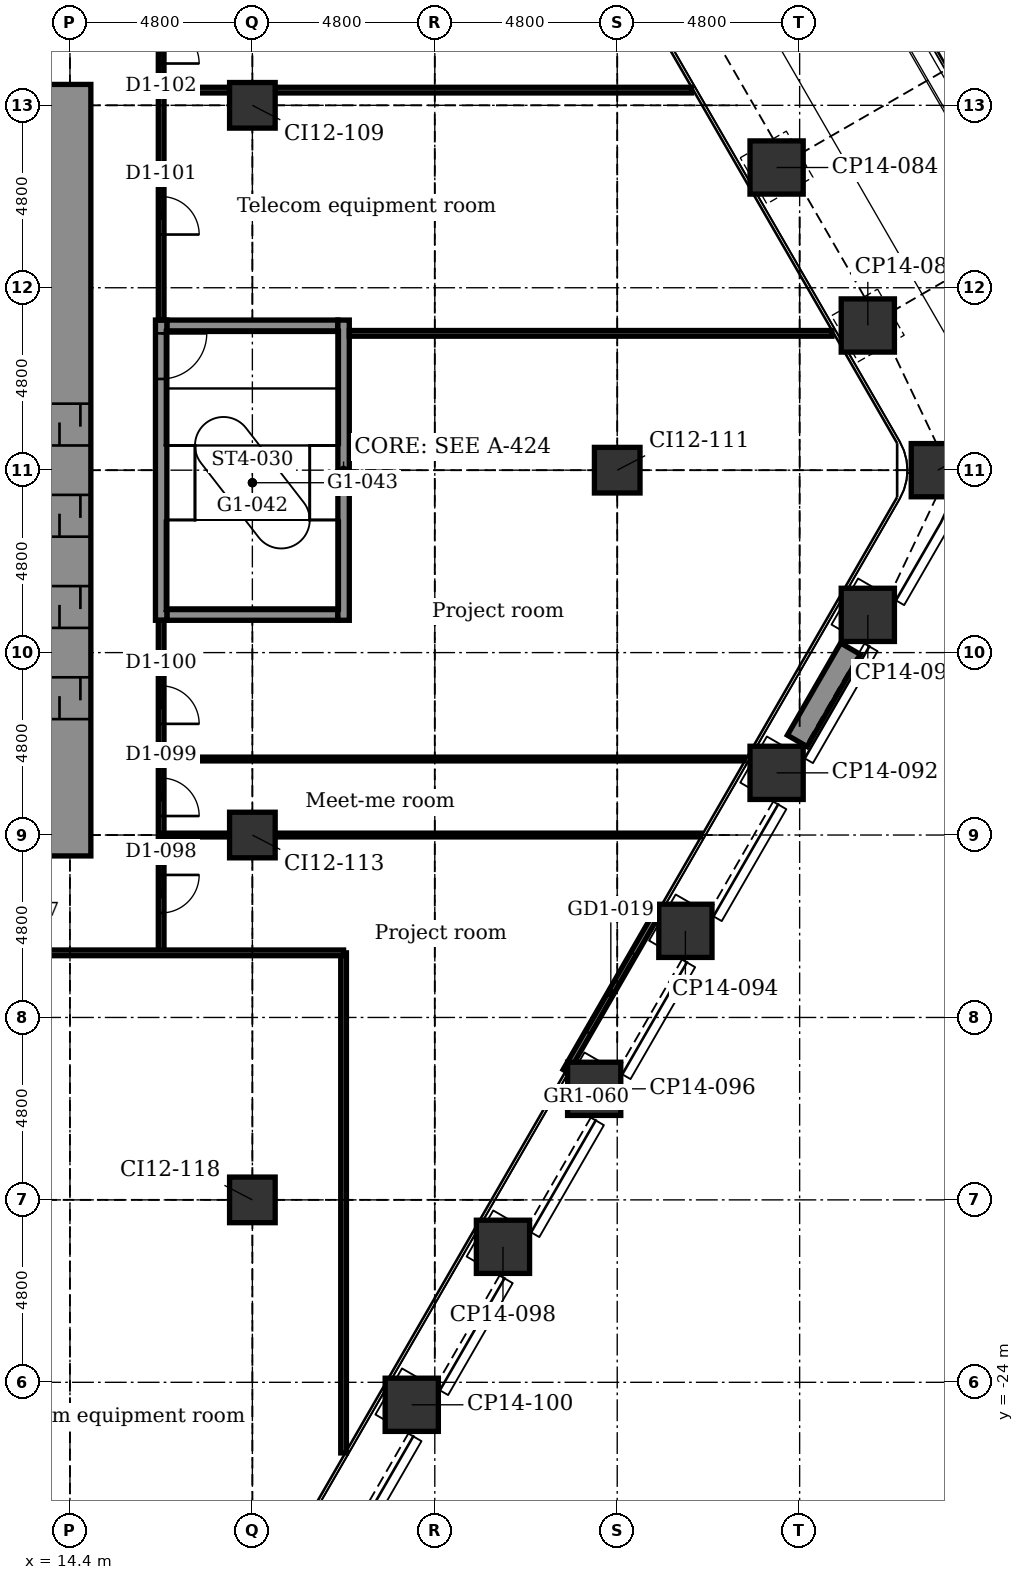
"""IFC4 building model, lengths in metres.
Left out: names, types, materials, properties, quantities, classifications, styles, units other than length and angle.
Written with IfcOpenShell. Run it as: python <this file> out.ifc"""

import sys

from ifc_helpers import new_model, si_unit, direction, frame, frame_2d, origin, origin_2d, place, context, subcontext, project, spatial, rectangle, extrude, element, fill, save


model = new_model("IFC4")
c1 = context("Model", 3, precision=1e-05, world=origin(), true_north=direction((0.0, 1.0)))
c2 = subcontext(c1, "Body", "Model", "MODEL_VIEW")
j1 = project(units=[si_unit("LENGTHUNIT", "METRE"), si_unit("PLANEANGLEUNIT", "RADIAN")], contexts=[c1])
p1 = place(None, origin())
s1 = spatial("IfcSite", under=j1, at=p1, CompositionType="ELEMENT")
p2 = place(p1, origin())
s2 = spatial("IfcBuilding", under=s1, at=p2, CompositionType="ELEMENT")
p3 = place(p2, frame((0.0, 0.0, 38.9)))
s3 = spatial("IfcBuildingStorey", under=s2, at=p3, CompositionType="ELEMENT", Elevation=38.9)
for number, where, z_axis, x_axis in (
    (1, (32.994, 7.964, -0.25), (0.0, 0.0, 1.0), (0.866, 0.5, 0.0)),
    (2, (35.394, 3.807, -0.25), (0.0, 0.0, 1.0), (0.866, 0.5, 0.0)),
    (3, (37.236, 0.0, -0.25), (0.0, 0.0, 1.0), (1.0, 0.0, 0.0)),
    (4, (35.394, -3.807, -0.25), (0.0, 0.0, 1.0), (0.5, 0.866, 0.0)),
    (5, (32.994, -7.964, -0.25), (0.0, 0.0, 1.0), (0.5, 0.866, 0.0)),
    (6, (30.594, -12.121, -0.25), (0.0, 0.0, 1.0), (0.5, 0.866, 0.0)),
    (7, (28.194, -16.278, -0.25), (0.0, 0.0, 1.0), (0.5, 0.866, 0.0)),
    (8, (25.794, -20.435, -0.25), (0.0, 0.0, 1.0), (0.5, 0.866, 0.0)),
    (9, (23.394, -24.592, -0.25), (0.0, 0.0, 1.0), (0.5, 0.866, 0.0)),
):
    element("IfcColumn", number, at=place(p3, frame(where, z_axis=z_axis, x_axis=x_axis)), inside=s3, PredefinedType="COLUMN", context=c2, shape_type="SweptSolid", body=[
        extrude(rectangle(XDim=1.4, YDim=1.4, at=origin_2d()), origin(), (0.0, 0.0, 1.0), 5.5),
    ])
for number, where, z_axis, x_axis in (
    (10, (19.2, -19.2, -0.25), (0.0, 0.0, 1.0), (1.0, 0.0, 0.0)),
    (11, (19.2, -9.6, -0.25), (0.0, 0.0, 1.0), (1.0, 0.0, 0.0)),
    (12, (19.2, 9.6, -0.25), (0.0, 0.0, 1.0), (1.0, 0.0, 0.0)),
    (13, (28.8, 0.0, -0.25), (0.0, 0.0, 1.0), (1.0, 0.0, 0.0)),
):
    element("IfcColumn", number, at=place(p3, frame(where, z_axis=z_axis, x_axis=x_axis)), inside=s3, PredefinedType="COLUMN", context=c2, shape_type="SweptSolid", body=[
        extrude(rectangle(XDim=1.2, YDim=1.2, at=origin_2d()), origin(), (0.0, 0.0, 1.0), 5.5),
    ])
for number, where, z_axis, x_axis in (
    (14, (16.95, -3.8, -0.25), (0.0, 0.0, 1.0), (1.0, 0.0, 0.0)),
    (15, (16.95, 3.8, -0.25), (0.0, 0.0, 1.0), (1.0, 0.0, 0.0)),
):
    element("IfcWall", number, at=place(p3, frame(where, z_axis=z_axis, x_axis=x_axis)), inside=s3, PredefinedType="STANDARD", context=c2, shape_type="SweptSolid", body=[
        extrude(rectangle(XDim=4.5, YDim=0.3, at=frame_2d((2.25, 0.0))), origin(), (0.0, 0.0, 1.0), 5.5),
    ])
p4 = place(p3, frame((14.4, -10.15, -0.25), z_axis=(0.0, 0.0, 1.0), x_axis=(0.0, 1.0, 0.0)))
e16 = element("IfcWall", 16, at=p4, inside=s3, PredefinedType="SHEAR", context=c2, shape_type="SweptSolid", body=[
    extrude(rectangle(XDim=20.3, YDim=1.1, at=frame_2d((10.15, 0.0))), origin(), (0.0, 0.0, 1.0), 5.5),
])
p5 = place(p4, frame((3.6, 0.0, 0.25)))
e17 = element("IfcOpeningElement", 17, at=p5, cuts=e16, PredefinedType="OPENING", context=c2, shape_type="SweptSolid", body=[
    extrude(rectangle(XDim=1.1, YDim=2.1, at=frame_2d((0.55, 1.05))), frame((0.0, 0.56, 0.0), z_axis=(0.0, -1.0, 0.0), x_axis=(1.0, 0.0, 0.0)), (0.0, 0.0, 1.0), 1.12),
])
p6 = place(p4, frame((6.0, 0.0, 0.25)))
e18 = element("IfcOpeningElement", 18, at=p6, cuts=e16, PredefinedType="OPENING", context=c2, shape_type="SweptSolid", body=[
    extrude(rectangle(XDim=1.1, YDim=2.1, at=frame_2d((0.55, 1.05))), frame((0.0, 0.56, 0.0), z_axis=(0.0, -1.0, 0.0), x_axis=(1.0, 0.0, 0.0)), (0.0, 0.0, 1.0), 1.12),
])
p7 = place(p4, frame((8.4, 0.0, 0.25)))
e19 = element("IfcOpeningElement", 19, at=p7, cuts=e16, PredefinedType="OPENING", context=c2, shape_type="SweptSolid", body=[
    extrude(rectangle(XDim=1.1, YDim=2.1, at=frame_2d((0.55, 1.05))), frame((0.0, 0.56, 0.0), z_axis=(0.0, -1.0, 0.0), x_axis=(1.0, 0.0, 0.0)), (0.0, 0.0, 1.0), 1.12),
])
p8 = place(p4, frame((10.8, 0.0, 0.25)))
e20 = element("IfcOpeningElement", 20, at=p8, cuts=e16, PredefinedType="OPENING", context=c2, shape_type="SweptSolid", body=[
    extrude(rectangle(XDim=1.1, YDim=2.1, at=frame_2d((0.55, 1.05))), frame((0.0, 0.56, 0.0), z_axis=(0.0, -1.0, 0.0), x_axis=(1.0, 0.0, 0.0)), (0.0, 0.0, 1.0), 1.12),
])
p9 = place(p3, frame((16.8, -3.95, -0.25), z_axis=(0.0, 0.0, 1.0), x_axis=(0.0, 1.0, 0.0)))
e21 = element("IfcWall", 21, at=p9, inside=s3, PredefinedType="STANDARD", context=c2, shape_type="SweptSolid", body=[
    extrude(rectangle(XDim=7.9, YDim=0.3, at=frame_2d((3.95, 0.0))), origin(), (0.0, 0.0, 1.0), 5.5),
])
p10 = place(p9, frame((6.35, 0.0, 0.25)))
e22 = element("IfcOpeningElement", 22, at=p10, cuts=e21, PredefinedType="OPENING", context=c2, shape_type="SweptSolid", body=[
    extrude(rectangle(XDim=1.2, YDim=2.1, at=frame_2d((0.6, 1.05))), frame((0.0, 0.16, 0.0), z_axis=(0.0, -1.0, 0.0), x_axis=(1.0, 0.0, 0.0)), (0.0, 0.0, 1.0), 0.32),
])
p11 = place(p3, frame((21.6, -3.95, -0.25), z_axis=(0.0, 0.0, 1.0), x_axis=(0.0, 1.0, 0.0)))
e23 = element("IfcWall", 23, at=p11, inside=s3, PredefinedType="STANDARD", context=c2, shape_type="SweptSolid", body=[
    extrude(rectangle(XDim=7.9, YDim=0.3, at=frame_2d((3.95, 0.0))), origin(), (0.0, 0.0, 1.0), 5.5),
])
p12 = place(p3, frame((29.817, -11.707, 0.0), z_axis=(0.0, 0.0, 1.0), x_axis=(-0.499978080042, -0.866038058908, 0.0)))
e24 = element("IfcWall", 24, at=p12, inside=s3, PredefinedType="PARTITIONING", context=c2, shape_type="SweptSolid", body=[
    extrude(rectangle(XDim=4.74, YDim=0.16, at=frame_2d((2.37, 0.0))), origin(), (0.0, 0.0, 1.0), 5.25),
])
p13 = place(p12, frame((1.17, 0.0, 0.0)))
e25 = element("IfcOpeningElement", 25, at=p13, cuts=e24, PredefinedType="OPENING", context=c2, shape_type="SweptSolid", body=[
    extrude(rectangle(XDim=2.4, YDim=2.4, at=frame_2d((1.2, 1.2))), frame((0.0, 0.09, 0.0), z_axis=(0.0, -1.0, 0.0), x_axis=(1.0, 0.0, 0.0)), (0.0, 0.0, 1.0), 0.18),
])
p14 = place(p3, frame((34.937, -4.698, 0.0), z_axis=(0.0, 0.0, 1.0), x_axis=(-0.49998411664, -0.866034573852, 0.0)))
e26 = element("IfcWall", 26, at=p14, inside=s3, PredefinedType="USERDEFINED", context=c2, shape_type="SweptSolid", body=[
    extrude(rectangle(XDim=2.8, YDim=0.6, at=frame_2d((1.4, 0.0))), origin(), (0.0, 0.0, 1.0), 0.7),
])
p15 = place(p3, frame((21.6, -25.858, 0.0), z_axis=(0.0, 0.0, 1.0), x_axis=(0.0, 1.0, 0.0)))
e27 = element("IfcWall", 27, at=p15, inside=s3, PredefinedType="PARTITIONING", context=c2, shape_type="SweptSolid", body=[
    extrude(rectangle(XDim=13.158, YDim=0.15, at=frame_2d((6.579, 0.0))), origin(), (0.0, 0.0, 1.0), 5.25),
])
p16 = place(p3, frame((16.8, -12.7, 0.0), z_axis=(0.0, 0.0, 1.0), x_axis=(0.0, 1.0, 0.0)))
e28 = element("IfcWall", 28, at=p16, inside=s3, PredefinedType="PARTITIONING", context=c2, shape_type="SweptSolid", body=[
    extrude(rectangle(XDim=8.75, YDim=0.15, at=frame_2d((4.375, 0.0))), origin(), (0.0, 0.0, 1.0), 5.25),
])
p17 = place(p16, frame((1.05, 0.0, 0.0)))
e29 = element("IfcOpeningElement", 29, at=p17, cuts=e28, PredefinedType="OPENING", context=c2, shape_type="SweptSolid", body=[
    extrude(rectangle(XDim=1.0, YDim=2.1, at=frame_2d((0.5, 1.05))), frame((0.0, 0.085, 0.0), z_axis=(0.0, -1.0, 0.0), x_axis=(1.0, 0.0, 0.0)), (0.0, 0.0, 1.0), 0.17),
])
p18 = place(p16, frame((3.6, 0.0, 0.0)))
e30 = element("IfcOpeningElement", 30, at=p18, cuts=e28, PredefinedType="OPENING", context=c2, shape_type="SweptSolid", body=[
    extrude(rectangle(XDim=1.0, YDim=2.1, at=frame_2d((0.5, 1.05))), frame((0.0, 0.085, 0.0), z_axis=(0.0, -1.0, 0.0), x_axis=(1.0, 0.0, 0.0)), (0.0, 0.0, 1.0), 0.17),
])
p19 = place(p16, frame((6.025, 0.0, 0.0)))
e31 = element("IfcOpeningElement", 31, at=p19, cuts=e28, PredefinedType="OPENING", context=c2, shape_type="SweptSolid", body=[
    extrude(rectangle(XDim=1.0, YDim=2.1, at=frame_2d((0.5, 1.05))), frame((0.0, 0.085, 0.0), z_axis=(0.0, -1.0, 0.0), x_axis=(1.0, 0.0, 0.0)), (0.0, 0.0, 1.0), 0.17),
])
p20 = place(p3, frame((16.8, 3.95, 0.0), z_axis=(0.0, 0.0, 1.0), x_axis=(0.0, 1.0, 0.0)))
e32 = element("IfcWall", 32, at=p20, inside=s3, PredefinedType="PARTITIONING", context=c2, shape_type="SweptSolid", body=[
    extrude(rectangle(XDim=8.45, YDim=0.15, at=frame_2d((4.225, 0.0))), origin(), (0.0, 0.0, 1.0), 5.25),
])
p21 = place(p20, frame((2.25, 0.0, 0.0)))
e33 = element("IfcOpeningElement", 33, at=p21, cuts=e32, PredefinedType="OPENING", context=c2, shape_type="SweptSolid", body=[
    extrude(rectangle(XDim=1.0, YDim=2.1, at=frame_2d((0.5, 1.05))), frame((0.0, 0.085, 0.0), z_axis=(0.0, -1.0, 0.0), x_axis=(1.0, 0.0, 0.0)), (0.0, 0.0, 1.0), 0.17),
])
p22 = place(p20, frame((6.75, 0.0, 0.0)))
e34 = element("IfcOpeningElement", 34, at=p22, cuts=e32, PredefinedType="OPENING", context=c2, shape_type="SweptSolid", body=[
    extrude(rectangle(XDim=1.0, YDim=2.1, at=frame_2d((0.5, 1.05))), frame((0.0, 0.085, 0.0), z_axis=(0.0, -1.0, 0.0), x_axis=(1.0, 0.0, 0.0)), (0.0, 0.0, 1.0), 0.17),
])
p23 = place(p3, frame((-16.8, -12.7, 0.0), z_axis=(0.0, 0.0, 1.0), x_axis=(1.0, 0.0, 0.0)))
e35 = element("IfcWall", 35, at=p23, inside=s3, PredefinedType="PARTITIONING", context=c2, shape_type="SweptSolid", body=[
    extrude(rectangle(XDim=38.4, YDim=0.15, at=frame_2d((19.2, 0.0))), origin(), (0.0, 0.0, 1.0), 5.25),
])
p24 = place(p23, frame((2.7, 0.0, 0.0)))
e36 = element("IfcOpeningElement", 36, at=p24, cuts=e35, PredefinedType="OPENING", context=c2, shape_type="SweptSolid", body=[
    extrude(rectangle(XDim=1.8, YDim=2.1, at=frame_2d((0.9, 1.05))), frame((0.0, 0.085, 0.0), z_axis=(0.0, -1.0, 0.0), x_axis=(1.0, 0.0, 0.0)), (0.0, 0.0, 1.0), 0.17),
])
p25 = place(p23, frame((14.415, 0.0, 0.0)))
e37 = element("IfcOpeningElement", 37, at=p25, cuts=e35, PredefinedType="OPENING", context=c2, shape_type="SweptSolid", body=[
    extrude(rectangle(XDim=1.0, YDim=2.1, at=frame_2d((0.5, 1.05))), frame((0.0, 0.085, 0.0), z_axis=(0.0, -1.0, 0.0), x_axis=(1.0, 0.0, 0.0)), (0.0, 0.0, 1.0), 0.17),
])
p26 = place(p23, frame((21.1, 0.0, 0.0)))
e38 = element("IfcOpeningElement", 38, at=p26, cuts=e35, PredefinedType="OPENING", context=c2, shape_type="SweptSolid", body=[
    extrude(rectangle(XDim=1.0, YDim=2.1, at=frame_2d((0.5, 1.05))), frame((0.0, 0.085, 0.0), z_axis=(0.0, -1.0, 0.0), x_axis=(1.0, 0.0, 0.0)), (0.0, 0.0, 1.0), 0.17),
])
p27 = place(p23, frame((29.5, 0.0, 0.0)))
e39 = element("IfcOpeningElement", 39, at=p27, cuts=e35, PredefinedType="OPENING", context=c2, shape_type="SweptSolid", body=[
    extrude(rectangle(XDim=1.0, YDim=2.1, at=frame_2d((0.5, 1.05))), frame((0.0, 0.085, 0.0), z_axis=(0.0, -1.0, 0.0), x_axis=(1.0, 0.0, 0.0)), (0.0, 0.0, 1.0), 0.17),
])
p28 = place(p23, frame((9.15, 0.0, 0.0)))
e40 = element("IfcOpeningElement", 40, at=p28, cuts=e35, PredefinedType="OPENING", context=c2, shape_type="SweptSolid", body=[
    extrude(rectangle(XDim=0.9, YDim=2.1, at=frame_2d((0.45, 1.05))), frame((0.0, 0.085, 0.0), z_axis=(0.0, -1.0, 0.0), x_axis=(1.0, 0.0, 0.0)), (0.0, 0.0, 1.0), 0.17),
])
p29 = place(p23, frame((12.15, 0.0, 0.0)))
e41 = element("IfcOpeningElement", 41, at=p29, cuts=e35, PredefinedType="OPENING", context=c2, shape_type="SweptSolid", body=[
    extrude(rectangle(XDim=0.9, YDim=2.1, at=frame_2d((0.45, 1.05))), frame((0.0, 0.085, 0.0), z_axis=(0.0, -1.0, 0.0), x_axis=(1.0, 0.0, 0.0)), (0.0, 0.0, 1.0), 0.17),
])
p30 = place(p3, frame((16.8, -9.6, 0.0), z_axis=(0.0, 0.0, 1.0), x_axis=(1.0, 0.0, 0.0)))
e42 = element("IfcWall", 42, at=p30, inside=s3, PredefinedType="PARTITIONING", context=c2, shape_type="SweptSolid", body=[
    extrude(rectangle(XDim=1.8, YDim=0.1, at=frame_2d((0.9, 0.0))), origin(), (0.0, 0.0, 1.0), 4.642),
])
p31 = place(p3, frame((19.8, -9.6, 0.0), z_axis=(0.0, 0.0, 1.0), x_axis=(1.0, 0.0, 0.0)))
e43 = element("IfcWall", 43, at=p31, inside=s3, PredefinedType="PARTITIONING", context=c2, shape_type="SweptSolid", body=[
    extrude(rectangle(XDim=11.187, YDim=0.1, at=frame_2d((5.593, 0.0))), origin(), (0.0, 0.0, 1.0), 4.488),
])
p32 = place(p3, frame((16.8, -7.6, 0.0), z_axis=(0.0, 0.0, 1.0), x_axis=(1.0, 0.0, 0.0)))
e44 = element("IfcWall", 44, at=p32, inside=s3, PredefinedType="PARTITIONING", context=c2, shape_type="SweptSolid", body=[
    extrude(rectangle(XDim=15.342, YDim=0.1, at=frame_2d((7.671, 0.0))), origin(), (0.0, 0.0, 1.0), 5.25),
])
p33 = place(p3, frame((21.75, 3.6, 0.0), z_axis=(0.0, 0.0, 1.0), x_axis=(1.0, 0.0, 0.0)))
e45 = element("IfcWall", 45, at=p33, inside=s3, PredefinedType="PARTITIONING", context=c2, shape_type="SweptSolid", body=[
    extrude(rectangle(XDim=12.701, YDim=0.15, at=frame_2d((6.351, 0.0))), origin(), (0.0, 0.0, 1.0), 5.25),
])
p34 = place(p3, frame((16.8, 10.0, 0.0), z_axis=(0.0, 0.0, 1.0), x_axis=(1.0, 0.0, 0.0)))
e46 = element("IfcWall", 46, at=p34, inside=s3, PredefinedType="PARTITIONING", context=c2, shape_type="SweptSolid", body=[
    extrude(rectangle(XDim=1.8, YDim=0.15, at=frame_2d((0.9, 0.0))), origin(), (0.0, 0.0, 1.0), 5.25),
])
p35 = place(p3, frame((19.8, 10.0, 0.0), z_axis=(0.0, 0.0, 1.0), x_axis=(1.0, 0.0, 0.0)))
e47 = element("IfcWall", 47, at=p35, inside=s3, PredefinedType="PARTITIONING", context=c2, shape_type="SweptSolid", body=[
    extrude(rectangle(XDim=10.956, YDim=0.15, at=frame_2d((5.478, 0.0))), origin(), (0.0, 0.0, 1.0), 5.25),
])
p36 = place(p13, origin())
e48 = element("IfcDoor", 48, at=p36, inside=s3, OperationType="DOUBLE_DOOR_SLIDING", PredefinedType="DOOR", context=c2, shape_type="SweptSolid", body=[
    extrude(rectangle(XDim=2.4, YDim=2.4, at=frame_2d((1.2, 1.2))), frame((0.0, 0.025, 0.0), z_axis=(0.0, -1.0, 0.0), x_axis=(1.0, 0.0, 0.0)), (0.0, 0.0, 1.0), 0.05),
])
fill(e25, e48)
p37 = place(p17, frame((1.0, 0.0, 0.0), z_axis=(0.0, 0.0, 1.0), x_axis=(-1.0, 0.0, 0.0)))
e49 = element("IfcDoor", 49, at=p37, inside=s3, OperationType="SINGLE_SWING_RIGHT", PredefinedType="DOOR", context=c2, shape_type="SweptSolid", body=[
    extrude(rectangle(XDim=1.0, YDim=2.1, at=frame_2d((0.5, 1.05))), frame((0.0, 0.025, 0.0), z_axis=(0.0, -1.0, 0.0), x_axis=(1.0, 0.0, 0.0)), (0.0, 0.0, 1.0), 0.05),
])
fill(e29, e49)
p38 = place(p18, frame((1.0, 0.0, 0.0), z_axis=(0.0, 0.0, 1.0), x_axis=(-1.0, 0.0, 0.0)))
e50 = element("IfcDoor", 50, at=p38, inside=s3, OperationType="SINGLE_SWING_LEFT", PredefinedType="DOOR", context=c2, shape_type="SweptSolid", body=[
    extrude(rectangle(XDim=1.0, YDim=2.1, at=frame_2d((0.5, 1.05))), frame((0.0, 0.025, 0.0), z_axis=(0.0, -1.0, 0.0), x_axis=(1.0, 0.0, 0.0)), (0.0, 0.0, 1.0), 0.05),
])
fill(e30, e50)
p39 = place(p19, frame((1.0, 0.0, 0.0), z_axis=(0.0, 0.0, 1.0), x_axis=(-1.0, 0.0, 0.0)))
e51 = element("IfcDoor", 51, at=p39, inside=s3, OperationType="SINGLE_SWING_LEFT", PredefinedType="DOOR", context=c2, shape_type="SweptSolid", body=[
    extrude(rectangle(XDim=1.0, YDim=2.1, at=frame_2d((0.5, 1.05))), frame((0.0, 0.025, 0.0), z_axis=(0.0, -1.0, 0.0), x_axis=(1.0, 0.0, 0.0)), (0.0, 0.0, 1.0), 0.05),
])
fill(e31, e51)
p40 = place(p21, frame((1.0, 0.0, 0.0), z_axis=(0.0, 0.0, 1.0), x_axis=(-1.0, 0.0, 0.0)))
e52 = element("IfcDoor", 52, at=p40, inside=s3, OperationType="SINGLE_SWING_LEFT", PredefinedType="DOOR", context=c2, shape_type="SweptSolid", body=[
    extrude(rectangle(XDim=1.0, YDim=2.1, at=frame_2d((0.5, 1.05))), frame((0.0, 0.025, 0.0), z_axis=(0.0, -1.0, 0.0), x_axis=(1.0, 0.0, 0.0)), (0.0, 0.0, 1.0), 0.05),
])
fill(e33, e52)
p41 = place(p22, frame((1.0, 0.0, 0.0), z_axis=(0.0, 0.0, 1.0), x_axis=(-1.0, 0.0, 0.0)))
e53 = element("IfcDoor", 53, at=p41, inside=s3, OperationType="SINGLE_SWING_LEFT", PredefinedType="DOOR", context=c2, shape_type="SweptSolid", body=[
    extrude(rectangle(XDim=1.0, YDim=2.1, at=frame_2d((0.5, 1.05))), frame((0.0, 0.025, 0.0), z_axis=(0.0, -1.0, 0.0), x_axis=(1.0, 0.0, 0.0)), (0.0, 0.0, 1.0), 0.05),
])
fill(e34, e53)
p42 = place(p5, origin())
e54 = element("IfcDoor", 54, at=p42, inside=s3, OperationType="DOUBLE_DOOR_SLIDING", PredefinedType="DOOR", context=c2, shape_type="SweptSolid", body=[
    extrude(rectangle(XDim=1.1, YDim=2.1, at=frame_2d((0.55, 1.05))), frame((0.0, 0.025, 0.0), z_axis=(0.0, -1.0, 0.0), x_axis=(1.0, 0.0, 0.0)), (0.0, 0.0, 1.0), 0.05),
])
fill(e17, e54)
p43 = place(p6, origin())
e55 = element("IfcDoor", 55, at=p43, inside=s3, OperationType="DOUBLE_DOOR_SLIDING", PredefinedType="DOOR", context=c2, shape_type="SweptSolid", body=[
    extrude(rectangle(XDim=1.1, YDim=2.1, at=frame_2d((0.55, 1.05))), frame((0.0, 0.025, 0.0), z_axis=(0.0, -1.0, 0.0), x_axis=(1.0, 0.0, 0.0)), (0.0, 0.0, 1.0), 0.05),
])
fill(e18, e55)
p44 = place(p7, origin())
e56 = element("IfcDoor", 56, at=p44, inside=s3, OperationType="DOUBLE_DOOR_SLIDING", PredefinedType="DOOR", context=c2, shape_type="SweptSolid", body=[
    extrude(rectangle(XDim=1.1, YDim=2.1, at=frame_2d((0.55, 1.05))), frame((0.0, 0.025, 0.0), z_axis=(0.0, -1.0, 0.0), x_axis=(1.0, 0.0, 0.0)), (0.0, 0.0, 1.0), 0.05),
])
fill(e19, e56)
p45 = place(p8, origin())
e57 = element("IfcDoor", 57, at=p45, inside=s3, OperationType="DOUBLE_DOOR_SLIDING", PredefinedType="DOOR", context=c2, shape_type="SweptSolid", body=[
    extrude(rectangle(XDim=1.1, YDim=2.1, at=frame_2d((0.55, 1.05))), frame((0.0, 0.025, 0.0), z_axis=(0.0, -1.0, 0.0), x_axis=(1.0, 0.0, 0.0)), (0.0, 0.0, 1.0), 0.05),
])
fill(e20, e57)
p46 = place(p10, frame((1.2, 0.0, 0.0), z_axis=(0.0, 0.0, 1.0), x_axis=(-1.0, 0.0, 0.0)))
e58 = element("IfcDoor", 58, at=p46, inside=s3, OperationType="SINGLE_SWING_RIGHT", PredefinedType="DOOR", context=c2, shape_type="SweptSolid", body=[
    extrude(rectangle(XDim=1.2, YDim=2.1, at=frame_2d((0.6, 1.05))), frame((0.0, 0.025, 0.0), z_axis=(0.0, -1.0, 0.0), x_axis=(1.0, 0.0, 0.0)), (0.0, 0.0, 1.0), 0.05),
])
fill(e22, e58)
save(model, sys.argv[1])
